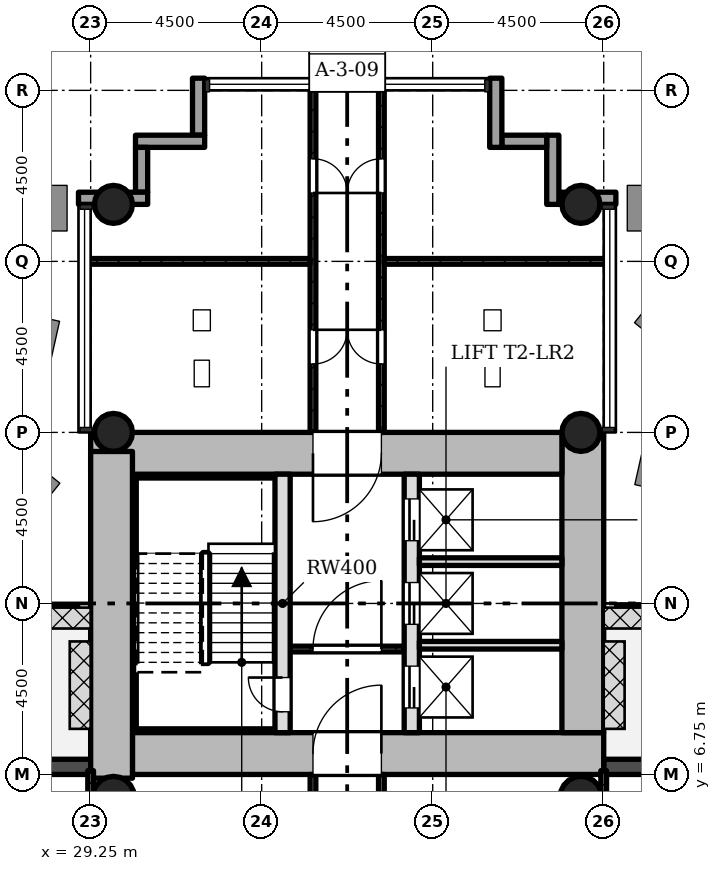
"""IFC4 building model, lengths in metres.
Left out: names, types, materials, properties, quantities, classifications, styles, units other than length and angle.
Written with IfcOpenShell. Run it as: python <this file> out.ifc"""

import sys

from ifc_helpers import new_model, si_unit, direction, frame, frame_2d, origin, origin_2d, place, context, subcontext, project, spatial, rectangle, hollow_circle, extrude, element, fill, save


model = new_model("IFC4")
c1 = context("Model", 3, precision=1e-05, world=origin(), true_north=direction((0.0, 1.0)))
c2 = subcontext(c1, "Body", "Model", "MODEL_VIEW")
j1 = project(units=[si_unit("LENGTHUNIT", "METRE"), si_unit("PLANEANGLEUNIT", "RADIAN")], contexts=[c1])
p1 = place(None, origin())
s1 = spatial("IfcSite", under=j1, at=p1, CompositionType="ELEMENT")
p2 = place(p1, origin())
s2 = spatial("IfcBuilding", under=s1, at=p2, CompositionType="ELEMENT")
p3 = place(p2, frame((0.0, 0.0, 72.1)))
s3 = spatial("IfcBuildingStorey", under=s2, at=p3, CompositionType="ELEMENT", Elevation=72.1)
p4 = place(p3, frame((30.35, 7.3, 0.0), z_axis=(0.0, 0.0, 1.0), x_axis=(1.0, 0.0, 0.0)))
e1 = element("IfcWall", 1, at=p4, inside=s3, PredefinedType="SHEAR", context=c2, shape_type="SweptSolid", body=[
    extrude(rectangle(XDim=12.4, YDim=1.1, at=frame_2d((6.2, 0.0))), origin(), (0.0, 0.0, 1.0), 4.5),
])
p5 = place(p4, frame((4.75, 0.0, 0.0)))
e2 = element("IfcOpeningElement", 2, at=p5, cuts=e1, PredefinedType="OPENING", context=c2, shape_type="SweptSolid", body=[
    extrude(rectangle(XDim=1.8, YDim=2.1, at=frame_2d((0.9, 1.05))), frame((0.0, 0.56, 0.0), z_axis=(0.0, -1.0, 0.0), x_axis=(1.0, 0.0, 0.0)), (0.0, 0.0, 1.0), 1.12),
])
p6 = place(p3, frame((42.2, 7.85, 0.0), z_axis=(0.0, 0.0, 1.0), x_axis=(0.0, 1.0, 0.0)))
e3 = element("IfcWall", 3, at=p6, inside=s3, PredefinedType="SHEAR", context=c2, shape_type="SweptSolid", body=[
    extrude(rectangle(XDim=7.9, YDim=1.1, at=frame_2d((3.95, 0.0))), origin(), (0.0, 0.0, 1.0), 4.5),
])
p7 = place(p3, frame((41.65, 15.2, 0.0), z_axis=(0.0, 0.0, 1.0), x_axis=(-1.0, 0.0, 0.0)))
e4 = element("IfcWall", 4, at=p7, inside=s3, PredefinedType="SHEAR", context=c2, shape_type="SweptSolid", body=[
    extrude(rectangle(XDim=12.4, YDim=1.1, at=frame_2d((6.2, 0.0))), origin(), (0.0, 0.0, 1.0), 4.5),
])
p8 = place(p7, frame((4.75, 0.0, 0.0)))
e5 = element("IfcOpeningElement", 5, at=p8, cuts=e4, PredefinedType="OPENING", context=c2, shape_type="SweptSolid", body=[
    extrude(rectangle(XDim=1.8, YDim=2.1, at=frame_2d((0.9, 1.05))), frame((0.0, 0.56, 0.0), z_axis=(0.0, -1.0, 0.0), x_axis=(1.0, 0.0, 0.0)), (0.0, 0.0, 1.0), 1.12),
])
p9 = place(p3, frame((29.8, 15.248, 0.0), z_axis=(0.0, 0.0, 1.0), x_axis=(0.0, -1.0, 0.0)))
e6 = element("IfcWall", 6, at=p9, inside=s3, PredefinedType="SHEAR", context=c2, shape_type="SweptSolid", body=[
    extrude(rectangle(XDim=8.596, YDim=1.1, at=frame_2d((4.298, 0.0))), origin(), (0.0, 0.0, 1.0), 4.5),
])
p10 = place(p3, frame((34.3, 7.85, 0.0), z_axis=(0.0, 0.0, 1.0), x_axis=(0.0, 1.0, 0.0)))
e7 = element("IfcWall", 7, at=p10, inside=s3, PredefinedType="SHEAR", context=c2, shape_type="SweptSolid", body=[
    extrude(rectangle(XDim=6.8, YDim=0.4, at=frame_2d((3.4, 0.0))), origin(), (0.0, 0.0, 1.0), 4.5),
])
p11 = place(p10, frame((0.55, 0.0, 0.0)))
e8 = element("IfcOpeningElement", 8, at=p11, cuts=e7, PredefinedType="OPENING", context=c2, shape_type="SweptSolid", body=[
    extrude(rectangle(XDim=0.9, YDim=2.1, at=frame_2d((0.45, 1.05))), frame((0.0, 0.21, 0.0), z_axis=(0.0, -1.0, 0.0), x_axis=(1.0, 0.0, 0.0)), (0.0, 0.0, 1.0), 0.42),
])
p12 = place(p3, frame((37.7, 7.85, 0.0), z_axis=(0.0, 0.0, 1.0), x_axis=(0.0, 1.0, 0.0)))
e9 = element("IfcWall", 9, at=p12, inside=s3, PredefinedType="SHEAR", context=c2, shape_type="SweptSolid", body=[
    extrude(rectangle(XDim=6.8, YDim=0.4, at=frame_2d((3.4, 0.0))), origin(), (0.0, 0.0, 1.0), 4.5),
])
p13 = place(p12, frame((0.65, 0.0, 0.0)))
e10 = element("IfcOpeningElement", 10, at=p13, cuts=e9, PredefinedType="OPENING", context=c2, shape_type="SweptSolid", body=[
    extrude(rectangle(XDim=1.1, YDim=2.1, at=frame_2d((0.55, 1.05))), frame((0.0, 0.21, 0.0), z_axis=(0.0, -1.0, 0.0), x_axis=(1.0, 0.0, 0.0)), (0.0, 0.0, 1.0), 0.42),
])
p14 = place(p12, frame((2.85, 0.0, 0.0)))
e11 = element("IfcOpeningElement", 11, at=p14, cuts=e9, PredefinedType="OPENING", context=c2, shape_type="SweptSolid", body=[
    extrude(rectangle(XDim=1.1, YDim=2.1, at=frame_2d((0.55, 1.05))), frame((0.0, 0.21, 0.0), z_axis=(0.0, -1.0, 0.0), x_axis=(1.0, 0.0, 0.0)), (0.0, 0.0, 1.0), 0.42),
])
p15 = place(p12, frame((5.05, 0.0, 0.0)))
e12 = element("IfcOpeningElement", 12, at=p15, cuts=e9, PredefinedType="OPENING", context=c2, shape_type="SweptSolid", body=[
    extrude(rectangle(XDim=1.1, YDim=2.1, at=frame_2d((0.55, 1.05))), frame((0.0, 0.21, 0.0), z_axis=(0.0, -1.0, 0.0), x_axis=(1.0, 0.0, 0.0)), (0.0, 0.0, 1.0), 0.42),
])
for number, where, z_axis, x_axis in (
    (13, (42.15, 15.75, 0.0), (0.0, 0.0, 1.0), (1.0, 0.0, 0.0)),
    (14, (29.85, 15.75, 0.0), (0.0, 0.0, 1.0), (1.0, 0.0, 0.0)),
    (15, (42.15, 21.75, 0.0), (0.0, 0.0, 1.0), (1.0, 0.0, 0.0)),
    (16, (29.85, 21.75, 0.0), (0.0, 0.0, 1.0), (1.0, 0.0, 0.0)),
):
    element("IfcColumn", number, at=place(p3, frame(where, z_axis=z_axis, x_axis=x_axis)), inside=s3, PredefinedType="COLUMN", context=c2, shape_type="SweptSolid", body=[
        extrude(hollow_circle(Radius=0.5, WallThickness=0.036, at=origin_2d()), origin(), (0.0, 0.0, 1.0), 4.5),
    ])
for number, where, z_axis, x_axis in (
    (17, (42.15, 6.15, 0.0), (0.0, 0.0, 1.0), (1.0, 0.0, 0.0)),
    (18, (29.85, 6.15, 0.0), (0.0, 0.0, 1.0), (1.0, 0.0, 0.0)),
):
    element("IfcColumn", number, at=place(p3, frame(where, z_axis=z_axis, x_axis=x_axis)), inside=s3, PredefinedType="COLUMN", context=c2, shape_type="SweptSolid", body=[
        extrude(hollow_circle(Radius=0.55, WallThickness=0.04, at=origin_2d()), origin(), (0.0, 0.0, 1.0), 4.5),
    ])
p16 = place(p3, frame((47.25, 6.95, -0.02), z_axis=(0.0, 0.0, 1.0), x_axis=(-1.0, 0.0, 0.0)))
e19 = element("IfcWall", 19, at=p16, inside=s3, PredefinedType="STANDARD", context=c2, shape_type="SweptSolid", body=[
    extrude(rectangle(XDim=4.5, YDim=0.4, at=frame_2d((2.25, 0.0))), origin(), (0.0, 0.0, 1.0), 4.22),
])
p17 = place(p16, frame((1.35, 0.0, 0.02)))
e20 = element("IfcOpeningElement", 20, at=p17, cuts=e19, PredefinedType="OPENING", context=c2, shape_type="SweptSolid", body=[
    extrude(rectangle(XDim=1.8, YDim=2.1, at=frame_2d((0.9, 1.05))), frame((0.0, 0.21, 0.0), z_axis=(0.0, -1.0, 0.0), x_axis=(1.0, 0.0, 0.0)), (0.0, 0.0, 1.0), 0.42),
])
p18 = place(p3, frame((43.07, 21.91, -0.3), z_axis=(0.0, 0.0, 1.0), x_axis=(-1.0, 0.0, 0.0)))
e21 = element("IfcWall", 21, at=p18, inside=s3, PredefinedType="STANDARD", context=c2, shape_type="SweptSolid", body=[
    extrude(rectangle(XDim=1.5, YDim=0.32, at=frame_2d((0.75, 0.0))), origin(), (0.0, 0.0, 1.0), 4.5),
])
p19 = place(p3, frame((41.41, 21.75, -0.3), z_axis=(0.0, 0.0, 1.0), x_axis=(0.0, 1.0, 0.0)))
e22 = element("IfcWall", 22, at=p19, inside=s3, PredefinedType="STANDARD", context=c2, shape_type="SweptSolid", body=[
    extrude(rectangle(XDim=1.82, YDim=0.32, at=frame_2d((0.91, 0.0))), origin(), (0.0, 0.0, 1.0), 4.5),
])
p20 = place(p3, frame((41.25, 23.41, -0.3), z_axis=(0.0, 0.0, 1.0), x_axis=(-1.0, 0.0, 0.0)))
e23 = element("IfcWall", 23, at=p20, inside=s3, PredefinedType="STANDARD", context=c2, shape_type="SweptSolid", body=[
    extrude(rectangle(XDim=1.18, YDim=0.32, at=frame_2d((0.59, 0.0))), origin(), (0.0, 0.0, 1.0), 4.5),
])
p21 = place(p3, frame((39.91, 23.25, -0.3), z_axis=(0.0, 0.0, 1.0), x_axis=(0.0, 1.0, 0.0)))
e24 = element("IfcWall", 24, at=p21, inside=s3, PredefinedType="STANDARD", context=c2, shape_type="SweptSolid", body=[
    extrude(rectangle(XDim=1.82, YDim=0.32, at=frame_2d((0.91, 0.0))), origin(), (0.0, 0.0, 1.0), 4.5),
])
p22 = place(p3, frame((32.09, 25.07, -0.3), z_axis=(0.0, 0.0, 1.0), x_axis=(0.0, -1.0, 0.0)))
e25 = element("IfcWall", 25, at=p22, inside=s3, PredefinedType="STANDARD", context=c2, shape_type="SweptSolid", body=[
    extrude(rectangle(XDim=1.5, YDim=0.32, at=frame_2d((0.75, 0.0))), origin(), (0.0, 0.0, 1.0), 4.5),
])
p23 = place(p3, frame((32.25, 23.41, -0.3), z_axis=(0.0, 0.0, 1.0), x_axis=(-1.0, 0.0, 0.0)))
e26 = element("IfcWall", 26, at=p23, inside=s3, PredefinedType="STANDARD", context=c2, shape_type="SweptSolid", body=[
    extrude(rectangle(XDim=1.82, YDim=0.32, at=frame_2d((0.91, 0.0))), origin(), (0.0, 0.0, 1.0), 4.5),
])
p24 = place(p3, frame((30.59, 23.25, -0.3), z_axis=(0.0, 0.0, 1.0), x_axis=(0.0, -1.0, 0.0)))
e27 = element("IfcWall", 27, at=p24, inside=s3, PredefinedType="STANDARD", context=c2, shape_type="SweptSolid", body=[
    extrude(rectangle(XDim=1.18, YDim=0.32, at=frame_2d((0.59, 0.0))), origin(), (0.0, 0.0, 1.0), 4.5),
])
p25 = place(p3, frame((30.75, 21.91, -0.3), z_axis=(0.0, 0.0, 1.0), x_axis=(-1.0, 0.0, 0.0)))
e28 = element("IfcWall", 28, at=p25, inside=s3, PredefinedType="STANDARD", context=c2, shape_type="SweptSolid", body=[
    extrude(rectangle(XDim=1.82, YDim=0.32, at=frame_2d((0.91, 0.0))), origin(), (0.0, 0.0, 1.0), 4.5),
])
p26 = place(p3, frame((29.25, 6.95, -0.02), z_axis=(0.0, 0.0, 1.0), x_axis=(-1.0, 0.0, 0.0)))
e29 = element("IfcWall", 29, at=p26, inside=s3, PredefinedType="STANDARD", context=c2, shape_type="SweptSolid", body=[
    extrude(rectangle(XDim=4.5, YDim=0.4, at=frame_2d((2.25, 0.0))), origin(), (0.0, 0.0, 1.0), 4.22),
])
p27 = place(p26, frame((1.35, 0.0, 0.02)))
e30 = element("IfcOpeningElement", 30, at=p27, cuts=e29, PredefinedType="OPENING", context=c2, shape_type="SweptSolid", body=[
    extrude(rectangle(XDim=1.8, YDim=2.1, at=frame_2d((0.9, 1.05))), frame((0.0, 0.21, 0.0), z_axis=(0.0, -1.0, 0.0), x_axis=(1.0, 0.0, 0.0)), (0.0, 0.0, 1.0), 0.42),
])
p28 = place(p3, frame((37.5, 10.05, 0.0), z_axis=(0.0, 0.0, 1.0), x_axis=(-1.0, 0.0, 0.0)))
e31 = element("IfcWall", 31, at=p28, inside=s3, PredefinedType="PARTITIONING", context=c2, shape_type="SweptSolid", body=[
    extrude(rectangle(XDim=3.0, YDim=0.15, at=frame_2d((1.5, 0.0))), origin(), (0.0, 0.0, 1.0), 4.08),
])
p29 = place(p28, frame((0.6, 0.0, 0.0)))
e32 = element("IfcOpeningElement", 32, at=p29, cuts=e31, PredefinedType="OPENING", context=c2, shape_type="SweptSolid", body=[
    extrude(rectangle(XDim=1.8, YDim=2.1, at=frame_2d((0.9, 1.05))), frame((0.0, 0.085, 0.0), z_axis=(0.0, -1.0, 0.0), x_axis=(1.0, 0.0, 0.0)), (0.0, 0.0, 1.0), 0.17),
])
for number, where, z_axis, x_axis in (
    (33, (41.65, 10.15, 0.0), (0.0, 0.0, 1.0), (-1.0, 0.0, 0.0)),
    (34, (41.65, 12.35, 0.0), (0.0, 0.0, 1.0), (-1.0, 0.0, 0.0)),
):
    element("IfcWall", number, at=place(p3, frame(where, z_axis=z_axis, x_axis=x_axis)), inside=s3, PredefinedType="SOLIDWALL", context=c2, shape_type="SweptSolid", body=[
        extrude(rectangle(XDim=3.75, YDim=0.2, at=frame_2d((1.875, 0.0))), origin(), (0.0, 0.0, 1.0), 4.08),
    ])
p30 = place(p3, frame((35.1, 0.9, 0.0), z_axis=(0.0, 0.0, 1.0), x_axis=(0.0, 1.0, 0.0)))
e35 = element("IfcWall", 35, at=p30, inside=s3, PredefinedType="PARTITIONING", context=c2, shape_type="SweptSolid", body=[
    extrude(rectangle(XDim=5.85, YDim=0.15, at=frame_2d((2.925, 0.0))), origin(), (0.0, 0.0, 1.0), 4.08),
])
p31 = place(p30, frame((2.475, 0.0, 0.0)))
e36 = element("IfcOpeningElement", 36, at=p31, cuts=e35, PredefinedType="OPENING", context=c2, shape_type="SweptSolid", body=[
    extrude(rectangle(XDim=0.9, YDim=2.1, at=frame_2d((0.45, 1.05))), frame((0.0, 0.085, 0.0), z_axis=(0.0, -1.0, 0.0), x_axis=(1.0, 0.0, 0.0)), (0.0, 0.0, 1.0), 0.17),
])
p32 = place(p3, frame((36.9, 0.9, 0.0), z_axis=(0.0, 0.0, 1.0), x_axis=(0.0, 1.0, 0.0)))
e37 = element("IfcWall", 37, at=p32, inside=s3, PredefinedType="PARTITIONING", context=c2, shape_type="SweptSolid", body=[
    extrude(rectangle(XDim=5.85, YDim=0.15, at=frame_2d((2.925, 0.0))), origin(), (0.0, 0.0, 1.0), 4.08),
])
p33 = place(p32, frame((2.475, 0.0, 0.0)))
e38 = element("IfcOpeningElement", 38, at=p33, cuts=e37, PredefinedType="OPENING", context=c2, shape_type="SweptSolid", body=[
    extrude(rectangle(XDim=0.9, YDim=2.1, at=frame_2d((0.45, 1.05))), frame((0.0, 0.085, 0.0), z_axis=(0.0, -1.0, 0.0), x_axis=(1.0, 0.0, 0.0)), (0.0, 0.0, 1.0), 0.17),
])
p34 = place(p3, frame((35.1, 15.75, 0.0), z_axis=(0.0, 0.0, 1.0), x_axis=(0.0, 1.0, 0.0)))
e39 = element("IfcWall", 39, at=p34, inside=s3, PredefinedType="PARTITIONING", context=c2, shape_type="SweptSolid", body=[
    extrude(rectangle(XDim=9.1, YDim=0.15, at=frame_2d((4.55, 0.0))), origin(), (0.0, 0.0, 1.0), 4.08),
])
p35 = place(p34, frame((1.8, 0.0, 0.0)))
e40 = element("IfcOpeningElement", 40, at=p35, cuts=e39, PredefinedType="OPENING", context=c2, shape_type="SweptSolid", body=[
    extrude(rectangle(XDim=0.9, YDim=2.1, at=frame_2d((0.45, 1.05))), frame((0.0, 0.085, 0.0), z_axis=(0.0, -1.0, 0.0), x_axis=(1.0, 0.0, 0.0)), (0.0, 0.0, 1.0), 0.17),
])
p36 = place(p34, frame((6.3, 0.0, 0.0)))
e41 = element("IfcOpeningElement", 41, at=p36, cuts=e39, PredefinedType="OPENING", context=c2, shape_type="SweptSolid", body=[
    extrude(rectangle(XDim=0.9, YDim=2.1, at=frame_2d((0.45, 1.05))), frame((0.0, 0.085, 0.0), z_axis=(0.0, -1.0, 0.0), x_axis=(1.0, 0.0, 0.0)), (0.0, 0.0, 1.0), 0.17),
])
p37 = place(p3, frame((35.025, 20.25, 0.0), z_axis=(0.0, 0.0, 1.0), x_axis=(-1.0, 0.0, 0.0)))
e42 = element("IfcWall", 42, at=p37, inside=s3, PredefinedType="PARTITIONING", context=c2, shape_type="SweptSolid", body=[
    extrude(rectangle(XDim=5.875, YDim=0.15, at=frame_2d((2.938, 0.0))), origin(), (0.0, 0.0, 1.0), 4.08),
])
p38 = place(p3, frame((36.9, 15.75, 0.0), z_axis=(0.0, 0.0, 1.0), x_axis=(0.0, 1.0, 0.0)))
e43 = element("IfcWall", 43, at=p38, inside=s3, PredefinedType="PARTITIONING", context=c2, shape_type="SweptSolid", body=[
    extrude(rectangle(XDim=9.1, YDim=0.15, at=frame_2d((4.55, 0.0))), origin(), (0.0, 0.0, 1.0), 4.08),
])
p39 = place(p38, frame((1.8, 0.0, 0.0)))
e44 = element("IfcOpeningElement", 44, at=p39, cuts=e43, PredefinedType="OPENING", context=c2, shape_type="SweptSolid", body=[
    extrude(rectangle(XDim=0.9, YDim=2.1, at=frame_2d((0.45, 1.05))), frame((0.0, 0.085, 0.0), z_axis=(0.0, -1.0, 0.0), x_axis=(1.0, 0.0, 0.0)), (0.0, 0.0, 1.0), 0.17),
])
p40 = place(p38, frame((6.3, 0.0, 0.0)))
e45 = element("IfcOpeningElement", 45, at=p40, cuts=e43, PredefinedType="OPENING", context=c2, shape_type="SweptSolid", body=[
    extrude(rectangle(XDim=0.9, YDim=2.1, at=frame_2d((0.45, 1.05))), frame((0.0, 0.085, 0.0), z_axis=(0.0, -1.0, 0.0), x_axis=(1.0, 0.0, 0.0)), (0.0, 0.0, 1.0), 0.17),
])
p41 = place(p3, frame((36.975, 20.25, 0.0), z_axis=(0.0, 0.0, 1.0), x_axis=(1.0, 0.0, 0.0)))
e46 = element("IfcWall", 46, at=p41, inside=s3, PredefinedType="PARTITIONING", context=c2, shape_type="SweptSolid", body=[
    extrude(rectangle(XDim=5.875, YDim=0.15, at=frame_2d((2.938, 0.0))), origin(), (0.0, 0.0, 1.0), 4.08),
])
p42 = place(p3, frame((29.25, -6.85, 0.0), z_axis=(0.0, 0.0, 1.0), x_axis=(0.0, 1.0, 0.0)))
e47 = element("IfcWall", 47, at=p42, inside=s3, PredefinedType="PARTITIONING", context=c2, shape_type="SweptSolid", body=[
    extrude(rectangle(XDim=13.7, YDim=0.15, at=frame_2d((6.85, 0.0))), origin(), (0.0, 0.0, 1.0), 4.08),
])
p43 = place(p42, frame((5.95, 0.0, 0.0)))
e48 = element("IfcOpeningElement", 48, at=p43, cuts=e47, PredefinedType="OPENING", context=c2, shape_type="SweptSolid", body=[
    extrude(rectangle(XDim=1.8, YDim=2.1, at=frame_2d((0.9, 1.05))), frame((0.0, 0.085, 0.0), z_axis=(0.0, -1.0, 0.0), x_axis=(1.0, 0.0, 0.0)), (0.0, 0.0, 1.0), 0.17),
])
p44 = place(p3, frame((42.75, -6.85, 0.0), z_axis=(0.0, 0.0, 1.0), x_axis=(0.0, 1.0, 0.0)))
e49 = element("IfcWall", 49, at=p44, inside=s3, PredefinedType="PARTITIONING", context=c2, shape_type="SweptSolid", body=[
    extrude(rectangle(XDim=13.7, YDim=0.15, at=frame_2d((6.85, 0.0))), origin(), (0.0, 0.0, 1.0), 4.08),
])
p45 = place(p44, frame((5.95, 0.0, 0.0)))
e50 = element("IfcOpeningElement", 50, at=p45, cuts=e49, PredefinedType="OPENING", context=c2, shape_type="SweptSolid", body=[
    extrude(rectangle(XDim=1.8, YDim=2.1, at=frame_2d((0.9, 1.05))), frame((0.0, 0.085, 0.0), z_axis=(0.0, -1.0, 0.0), x_axis=(1.0, 0.0, 0.0)), (0.0, 0.0, 1.0), 0.17),
])
p46 = place(p3, frame((34.1, 14.6, 0.0), z_axis=(0.0, 0.0, 1.0), x_axis=(-1.0, 0.0, 0.0)))
e51 = element("IfcWall", 51, at=p46, inside=s3, PredefinedType="SHEAR", context=c2, shape_type="SweptSolid", body=[
    extrude(rectangle(XDim=3.75, YDim=0.1, at=frame_2d((1.875, 0.0))), origin(), (0.0, 0.0, 1.0), 4.5),
])
p47 = place(p3, frame((30.4, 7.95, 0.0), z_axis=(0.0, 0.0, 1.0), x_axis=(0.0, 1.0, 0.0)))
e52 = element("IfcWall", 52, at=p47, inside=s3, PredefinedType="SHEAR", context=c2, shape_type="SweptSolid", body=[
    extrude(rectangle(XDim=6.6, YDim=0.1, at=frame_2d((3.3, 0.0))), origin(), (0.0, 0.0, 1.0), 4.5),
])
p48 = place(p3, frame((34.1, 7.9, 0.0), z_axis=(0.0, 0.0, 1.0), x_axis=(-1.0, 0.0, 0.0)))
e53 = element("IfcWall", 53, at=p48, inside=s3, PredefinedType="SHEAR", context=c2, shape_type="SweptSolid", body=[
    extrude(rectangle(XDim=3.75, YDim=0.1, at=frame_2d((1.875, 0.0))), origin(), (0.0, 0.0, 1.0), 4.5),
])
p49 = place(p29, origin())
e54 = element("IfcDoor", 54, at=p49, inside=s3, OperationType="SINGLE_SWING_LEFT", PredefinedType="DOOR", context=c2, shape_type="SweptSolid", body=[
    extrude(rectangle(XDim=1.8, YDim=2.1, at=frame_2d((0.9, 1.05))), frame((0.0, 0.025, 0.0), z_axis=(0.0, -1.0, 0.0), x_axis=(1.0, 0.0, 0.0)), (0.0, 0.0, 1.0), 0.05),
])
fill(e32, e54)
p50 = place(p35, origin())
e55 = element("IfcDoor", 55, at=p50, inside=s3, OperationType="SINGLE_SWING_RIGHT", PredefinedType="DOOR", context=c2, shape_type="SweptSolid", body=[
    extrude(rectangle(XDim=0.9, YDim=2.1, at=frame_2d((0.45, 1.05))), frame((0.0, 0.025, 0.0), z_axis=(0.0, -1.0, 0.0), x_axis=(1.0, 0.0, 0.0)), (0.0, 0.0, 1.0), 0.05),
])
fill(e40, e55)
p51 = place(p36, origin())
e56 = element("IfcDoor", 56, at=p51, inside=s3, OperationType="SINGLE_SWING_LEFT", PredefinedType="DOOR", context=c2, shape_type="SweptSolid", body=[
    extrude(rectangle(XDim=0.9, YDim=2.1, at=frame_2d((0.45, 1.05))), frame((0.0, 0.025, 0.0), z_axis=(0.0, -1.0, 0.0), x_axis=(1.0, 0.0, 0.0)), (0.0, 0.0, 1.0), 0.05),
])
fill(e41, e56)
p52 = place(p39, origin())
e57 = element("IfcDoor", 57, at=p52, inside=s3, OperationType="SINGLE_SWING_LEFT", PredefinedType="DOOR", context=c2, shape_type="SweptSolid", body=[
    extrude(rectangle(XDim=0.9, YDim=2.1, at=frame_2d((0.45, 1.05))), frame((0.0, 0.025, 0.0), z_axis=(0.0, -1.0, 0.0), x_axis=(1.0, 0.0, 0.0)), (0.0, 0.0, 1.0), 0.05),
])
fill(e44, e57)
p53 = place(p40, origin())
e58 = element("IfcDoor", 58, at=p53, inside=s3, OperationType="SINGLE_SWING_RIGHT", PredefinedType="DOOR", context=c2, shape_type="SweptSolid", body=[
    extrude(rectangle(XDim=0.9, YDim=2.1, at=frame_2d((0.45, 1.05))), frame((0.0, 0.025, 0.0), z_axis=(0.0, -1.0, 0.0), x_axis=(1.0, 0.0, 0.0)), (0.0, 0.0, 1.0), 0.05),
])
fill(e45, e58)
p54 = place(p11, origin())
e59 = element("IfcDoor", 59, at=p54, inside=s3, OperationType="SINGLE_SWING_LEFT", PredefinedType="DOOR", context=c2, shape_type="SweptSolid", body=[
    extrude(rectangle(XDim=0.9, YDim=2.1, at=frame_2d((0.45, 1.05))), frame((0.0, 0.025, 0.0), z_axis=(0.0, -1.0, 0.0), x_axis=(1.0, 0.0, 0.0)), (0.0, 0.0, 1.0), 0.05),
])
fill(e8, e59)
p55 = place(p13, origin())
e60 = element("IfcDoor", 60, at=p55, inside=s3, OperationType="SLIDING_TO_LEFT", PredefinedType="DOOR", context=c2, shape_type="SweptSolid", body=[
    extrude(rectangle(XDim=1.1, YDim=2.1, at=frame_2d((0.55, 1.05))), frame((0.0, 0.025, 0.0), z_axis=(0.0, -1.0, 0.0), x_axis=(1.0, 0.0, 0.0)), (0.0, 0.0, 1.0), 0.05),
])
fill(e10, e60)
p56 = place(p14, origin())
e61 = element("IfcDoor", 61, at=p56, inside=s3, OperationType="SLIDING_TO_LEFT", PredefinedType="DOOR", context=c2, shape_type="SweptSolid", body=[
    extrude(rectangle(XDim=1.1, YDim=2.1, at=frame_2d((0.55, 1.05))), frame((0.0, 0.025, 0.0), z_axis=(0.0, -1.0, 0.0), x_axis=(1.0, 0.0, 0.0)), (0.0, 0.0, 1.0), 0.05),
])
fill(e11, e61)
p57 = place(p15, origin())
e62 = element("IfcDoor", 62, at=p57, inside=s3, OperationType="SLIDING_TO_LEFT", PredefinedType="DOOR", context=c2, shape_type="SweptSolid", body=[
    extrude(rectangle(XDim=1.1, YDim=2.1, at=frame_2d((0.55, 1.05))), frame((0.0, 0.025, 0.0), z_axis=(0.0, -1.0, 0.0), x_axis=(1.0, 0.0, 0.0)), (0.0, 0.0, 1.0), 0.05),
])
fill(e12, e62)
p58 = place(p5, origin())
e63 = element("IfcDoor", 63, at=p58, inside=s3, OperationType="SINGLE_SWING_LEFT", PredefinedType="DOOR", context=c2, shape_type="SweptSolid", body=[
    extrude(rectangle(XDim=1.8, YDim=2.1, at=frame_2d((0.9, 1.05))), frame((0.0, 0.025, 0.0), z_axis=(0.0, -1.0, 0.0), x_axis=(1.0, 0.0, 0.0)), (0.0, 0.0, 1.0), 0.05),
])
fill(e2, e63)
p59 = place(p8, origin())
e64 = element("IfcDoor", 64, at=p59, inside=s3, OperationType="SINGLE_SWING_LEFT", PredefinedType="DOOR", context=c2, shape_type="SweptSolid", body=[
    extrude(rectangle(XDim=1.8, YDim=2.1, at=frame_2d((0.9, 1.05))), frame((0.0, 0.025, 0.0), z_axis=(0.0, -1.0, 0.0), x_axis=(1.0, 0.0, 0.0)), (0.0, 0.0, 1.0), 0.05),
])
fill(e5, e64)
save(model, sys.argv[1])
